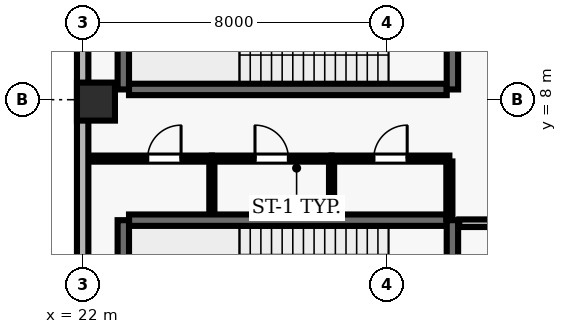
"""IFC4 building model, lengths in metres.
Left out: names, types, materials, properties, quantities, classifications, styles, units other than length and angle.
Written with IfcOpenShell. Run it as: python <this file> out.ifc"""

import sys

from ifc_helpers import new_model, si_unit, direction, frame, frame_2d, origin, origin_2d, place, context, subcontext, project, spatial, rectangle, extrude, element, fill, save


model = new_model("IFC4")
c1 = context("Model", 3, precision=1e-05, world=origin(), true_north=direction((0.0, 1.0)))
c2 = subcontext(c1, "Body", "Model", "MODEL_VIEW")
j1 = project(units=[si_unit("LENGTHUNIT", "METRE"), si_unit("PLANEANGLEUNIT", "RADIAN")], contexts=[c1])
p1 = place(None, origin())
s1 = spatial("IfcSite", under=j1, at=p1, CompositionType="ELEMENT")
p2 = place(p1, origin())
s2 = spatial("IfcBuilding", under=s1, at=p2, CompositionType="ELEMENT")
p3 = place(p2, frame((0.0, 0.0, 170.8)))
s3 = spatial("IfcBuildingStorey", under=s2, at=p3, CompositionType="ELEMENT", Elevation=170.8)
p4 = place(p3, frame((22.35, 7.95, 0.0), z_axis=(0.0, 0.0, 1.0), x_axis=(1.0, 0.0, 0.0)))
e1 = element("IfcColumn", 1, at=p4, inside=s3, PredefinedType="COLUMN", context=c2, shape_type="SweptSolid", body=[
    extrude(rectangle(XDim=1.0, YDim=1.0, at=origin_2d()), origin(), (0.0, 0.0, 1.0), 5.0),
])
p5 = place(p3, frame((22.0, 40.7, 0.0), z_axis=(0.0, 0.0, 1.0), x_axis=(0.0, -1.0, 0.0)))
e2 = element("IfcWall", 2, at=p5, inside=s3, PredefinedType="SOLIDWALL", context=c2, shape_type="SweptSolid", body=[
    extrude(rectangle(XDim=38.2, YDim=0.3, at=frame_2d((19.1, 0.0))), origin(), (0.0, 0.0, 1.0), 4.79),
])
p6 = place(p5, frame((7.8, 0.0, 0.0)))
e3 = element("IfcOpeningElement", 3, at=p6, cuts=e2, PredefinedType="OPENING", context=c2, shape_type="SweptSolid", body=[
    extrude(rectangle(XDim=1.0, YDim=2.2, at=frame_2d((0.5, 1.1))), frame((0.0, 0.16, 0.0), z_axis=(0.0, -1.0, 0.0), x_axis=(1.0, 0.0, 0.0)), (0.0, 0.0, 1.0), 0.32),
])
p7 = place(p5, frame((1.979, 0.0, 0.9)))
e4 = element("IfcOpeningElement", 4, at=p7, cuts=e2, PredefinedType="OPENING", context=c2, shape_type="SweptSolid", body=[
    extrude(rectangle(XDim=1.5, YDim=1.8, at=frame_2d((0.75, 0.9))), frame((0.0, 0.16, 0.0), z_axis=(0.0, -1.0, 0.0), x_axis=(1.0, 0.0, 0.0)), (0.0, 0.0, 1.0), 0.32),
])
p8 = place(p5, frame((12.443, 0.0, 0.9)))
e5 = element("IfcOpeningElement", 5, at=p8, cuts=e2, PredefinedType="OPENING", context=c2, shape_type="SweptSolid", body=[
    extrude(rectangle(XDim=1.5, YDim=1.8, at=frame_2d((0.75, 0.9))), frame((0.0, 0.16, 0.0), z_axis=(0.0, -1.0, 0.0), x_axis=(1.0, 0.0, 0.0)), (0.0, 0.0, 1.0), 0.32),
])
p9 = place(p5, frame((18.35, 0.0, 0.9)))
e6 = element("IfcOpeningElement", 6, at=p9, cuts=e2, PredefinedType="OPENING", context=c2, shape_type="SweptSolid", body=[
    extrude(rectangle(XDim=1.5, YDim=1.8, at=frame_2d((0.75, 0.9))), frame((0.0, 0.16, 0.0), z_axis=(0.0, -1.0, 0.0), x_axis=(1.0, 0.0, 0.0)), (0.0, 0.0, 1.0), 0.32),
])
p10 = place(p5, frame((23.807, 0.0, 0.9)))
e7 = element("IfcOpeningElement", 7, at=p10, cuts=e2, PredefinedType="OPENING", context=c2, shape_type="SweptSolid", body=[
    extrude(rectangle(XDim=1.5, YDim=1.8, at=frame_2d((0.75, 0.9))), frame((0.0, 0.16, 0.0), z_axis=(0.0, -1.0, 0.0), x_axis=(1.0, 0.0, 0.0)), (0.0, 0.0, 1.0), 0.32),
])
p11 = place(p5, frame((29.264, 0.0, 0.9)))
e8 = element("IfcOpeningElement", 8, at=p11, cuts=e2, PredefinedType="OPENING", context=c2, shape_type="SweptSolid", body=[
    extrude(rectangle(XDim=1.5, YDim=1.8, at=frame_2d((0.75, 0.9))), frame((0.0, 0.16, 0.0), z_axis=(0.0, -1.0, 0.0), x_axis=(1.0, 0.0, 0.0)), (0.0, 0.0, 1.0), 0.32),
])
p12 = place(p3, frame((31.58, 4.83, 0.0), z_axis=(0.0, 0.0, 1.0), x_axis=(-1.0, 0.0, 0.0)))
e9 = element("IfcWall", 9, at=p12, inside=s3, PredefinedType="SHEAR", context=c2, shape_type="SweptSolid", body=[
    extrude(rectangle(XDim=8.36, YDim=0.3, at=frame_2d((4.18, 0.0))), origin(), (0.0, 0.0, 1.0), 4.79),
])
p13 = place(p3, frame((23.07, 4.83, 0.0), z_axis=(0.0, 0.0, 1.0), x_axis=(0.0, -1.0, 0.0)))
e10 = element("IfcWall", 10, at=p13, inside=s3, PredefinedType="SHEAR", context=c2, shape_type="SweptSolid", body=[
    extrude(rectangle(XDim=3.51, YDim=0.3, at=frame_2d((1.755, 0.0))), origin(), (0.0, 0.0, 1.0), 4.79),
])
p14 = place(p3, frame((31.73, 0.96, 0.0), z_axis=(0.0, 0.0, 1.0), x_axis=(0.0, 1.0, 0.0)))
e11 = element("IfcWall", 11, at=p14, inside=s3, PredefinedType="SHEAR", context=c2, shape_type="SweptSolid", body=[
    extrude(rectangle(XDim=3.87, YDim=0.3, at=frame_2d((1.935, 0.0))), origin(), (0.0, 0.0, 1.0), 4.79),
])
p15 = place(p14, frame((1.54, 0.0, 0.0)))
e12 = element("IfcOpeningElement", 12, at=p15, cuts=e11, PredefinedType="OPENING", context=c2, shape_type="SweptSolid", body=[
    extrude(rectangle(XDim=1.15, YDim=2.15, at=frame_2d((0.575, 1.075))), frame((0.0, 0.16, 0.0), z_axis=(0.0, -1.0, 0.0), x_axis=(1.0, 0.0, 0.0)), (0.0, 0.0, 1.0), 0.32),
])
p16 = place(p3, frame((23.07, 11.78, 0.0), z_axis=(0.0, 0.0, 1.0), x_axis=(0.0, -1.0, 0.0)))
e13 = element("IfcWall", 13, at=p16, inside=s3, PredefinedType="SHEAR", context=c2, shape_type="SweptSolid", body=[
    extrude(rectangle(XDim=3.51, YDim=0.3, at=frame_2d((1.755, 0.0))), origin(), (0.0, 0.0, 1.0), 4.79),
])
p17 = place(p3, frame((23.22, 8.27, 0.0), z_axis=(0.0, 0.0, 1.0), x_axis=(1.0, 0.0, 0.0)))
e14 = element("IfcWall", 14, at=p17, inside=s3, PredefinedType="SHEAR", context=c2, shape_type="SweptSolid", body=[
    extrude(rectangle(XDim=8.36, YDim=0.3, at=frame_2d((4.18, 0.0))), origin(), (0.0, 0.0, 1.0), 4.79),
])
p18 = place(p3, frame((31.73, 8.27, 0.0), z_axis=(0.0, 0.0, 1.0), x_axis=(0.0, 1.0, 0.0)))
e15 = element("IfcWall", 15, at=p18, inside=s3, PredefinedType="SHEAR", context=c2, shape_type="SweptSolid", body=[
    extrude(rectangle(XDim=3.51, YDim=0.3, at=frame_2d((1.755, 0.0))), origin(), (0.0, 0.0, 1.0), 4.79),
])
p19 = place(p18, frame((1.18, 0.0, 0.0)))
e16 = element("IfcOpeningElement", 16, at=p19, cuts=e15, PredefinedType="OPENING", context=c2, shape_type="SweptSolid", body=[
    extrude(rectangle(XDim=1.15, YDim=2.15, at=frame_2d((0.575, 1.075))), frame((0.0, 0.16, 0.0), z_axis=(0.0, -1.0, 0.0), x_axis=(1.0, 0.0, 0.0)), (0.0, 0.0, 1.0), 0.32),
])
p20 = place(p3, frame((22.2, 6.45, 0.0), z_axis=(0.0, 0.0, 1.0), x_axis=(1.0, 0.0, 0.0)))
e17 = element("IfcWall", 17, at=p20, inside=s3, PredefinedType="PARTITIONING", context=c2, shape_type="SweptSolid", body=[
    extrude(rectangle(XDim=3.2, YDim=0.16, at=frame_2d((1.6, 0.0))), origin(), (0.0, 0.0, 1.0), 4.79),
])
p21 = place(p20, frame((1.51, 0.0, 0.0)))
e18 = element("IfcOpeningElement", 18, at=p21, cuts=e17, PredefinedType="OPENING", context=c2, shape_type="SweptSolid", body=[
    extrude(rectangle(XDim=0.88, YDim=2.1, at=frame_2d((0.44, 1.05))), frame((0.0, 0.09, 0.0), z_axis=(0.0, -1.0, 0.0), x_axis=(1.0, 0.0, 0.0)), (0.0, 0.0, 1.0), 0.18),
])
p22 = place(p3, frame((25.4, 6.45, 0.0), z_axis=(0.0, 0.0, 1.0), x_axis=(1.0, 0.0, 0.0)))
e19 = element("IfcWall", 19, at=p22, inside=s3, PredefinedType="PARTITIONING", context=c2, shape_type="SweptSolid", body=[
    extrude(rectangle(XDim=3.15, YDim=0.16, at=frame_2d((1.575, 0.0))), origin(), (0.0, 0.0, 1.0), 4.79),
])
p23 = place(p22, frame((1.135, 0.0, 0.0)))
e20 = element("IfcOpeningElement", 20, at=p23, cuts=e19, PredefinedType="OPENING", context=c2, shape_type="SweptSolid", body=[
    extrude(rectangle(XDim=0.88, YDim=2.1, at=frame_2d((0.44, 1.05))), frame((0.0, 0.09, 0.0), z_axis=(0.0, -1.0, 0.0), x_axis=(1.0, 0.0, 0.0)), (0.0, 0.0, 1.0), 0.18),
])
p24 = place(p3, frame((28.55, 6.45, 0.0), z_axis=(0.0, 0.0, 1.0), x_axis=(1.0, 0.0, 0.0)))
e21 = element("IfcWall", 21, at=p24, inside=s3, PredefinedType="PARTITIONING", context=c2, shape_type="SweptSolid", body=[
    extrude(rectangle(XDim=3.1, YDim=0.16, at=frame_2d((1.55, 0.0))), origin(), (0.0, 0.0, 1.0), 4.79),
])
p25 = place(p24, frame((1.11, 0.0, 0.0)))
e22 = element("IfcOpeningElement", 22, at=p25, cuts=e21, PredefinedType="OPENING", context=c2, shape_type="SweptSolid", body=[
    extrude(rectangle(XDim=0.88, YDim=2.1, at=frame_2d((0.44, 1.05))), frame((0.0, 0.09, 0.0), z_axis=(0.0, -1.0, 0.0), x_axis=(1.0, 0.0, 0.0)), (0.0, 0.0, 1.0), 0.18),
])
p26 = place(p3, frame((35.02, 4.75, 0.0), z_axis=(0.0, 0.0, 1.0), x_axis=(-1.0, 0.0, 0.0)))
e23 = element("IfcWall", 23, at=p26, inside=s3, PredefinedType="SOLIDWALL", context=c2, shape_type="SweptSolid", body=[
    extrude(rectangle(XDim=3.11, YDim=0.2, at=frame_2d((1.555, 0.0))), origin(), (0.0, 0.0, 1.0), 4.79),
])
p27 = place(p26, frame((1.03, 0.0, 0.0)))
e24 = element("IfcOpeningElement", 24, at=p27, cuts=e23, PredefinedType="OPENING", context=c2, shape_type="SweptSolid", body=[
    extrude(rectangle(XDim=1.05, YDim=2.15, at=frame_2d((0.525, 1.075))), frame((0.0, 0.11, 0.0), z_axis=(0.0, -1.0, 0.0), x_axis=(1.0, 0.0, 0.0)), (0.0, 0.0, 1.0), 0.22),
])
for number, where, z_axis, x_axis in (
    (25, (25.4, 5.01, 0.0), (0.0, 0.0, 1.0), (0.0, 1.0, 0.0)),
    (26, (28.55, 5.01, 0.0), (0.0, 0.0, 1.0), (0.0, 1.0, 0.0)),
):
    element("IfcWall", number, at=place(p3, frame(where, z_axis=z_axis, x_axis=x_axis)), inside=s3, PredefinedType="PARTITIONING", context=c2, shape_type="SweptSolid", body=[
        extrude(rectangle(XDim=1.365, YDim=0.135, at=frame_2d((0.683, 0.0))), origin(), (0.0, 0.0, 1.0), 4.79),
    ])
p28 = place(p3, frame((31.65, 4.86, 0.0), z_axis=(0.0, 0.0, 1.0), x_axis=(0.0, 1.0, 0.0)))
e27 = element("IfcWall", 27, at=p28, inside=s3, PredefinedType="PARTITIONING", context=c2, shape_type="SweptSolid", body=[
    extrude(rectangle(XDim=1.515, YDim=0.16, at=frame_2d((0.757, 0.0))), origin(), (0.0, 0.0, 1.0), 4.79),
])
p29 = place(p21, origin())
e28 = element("IfcDoor", 28, at=p29, inside=s3, OperationType="SINGLE_SWING_RIGHT", PredefinedType="DOOR", context=c2, shape_type="SweptSolid", body=[
    extrude(rectangle(XDim=0.88, YDim=2.1, at=frame_2d((0.44, 1.05))), frame((0.0, 0.025, 0.0), z_axis=(0.0, -1.0, 0.0), x_axis=(1.0, 0.0, 0.0)), (0.0, 0.0, 1.0), 0.05),
])
fill(e18, e28)
p30 = place(p23, origin())
e29 = element("IfcDoor", 29, at=p30, inside=s3, OperationType="SINGLE_SWING_LEFT", PredefinedType="DOOR", context=c2, shape_type="SweptSolid", body=[
    extrude(rectangle(XDim=0.88, YDim=2.1, at=frame_2d((0.44, 1.05))), frame((0.0, 0.025, 0.0), z_axis=(0.0, -1.0, 0.0), x_axis=(1.0, 0.0, 0.0)), (0.0, 0.0, 1.0), 0.05),
])
fill(e20, e29)
p31 = place(p25, origin())
e30 = element("IfcDoor", 30, at=p31, inside=s3, OperationType="SINGLE_SWING_RIGHT", PredefinedType="DOOR", context=c2, shape_type="SweptSolid", body=[
    extrude(rectangle(XDim=0.88, YDim=2.1, at=frame_2d((0.44, 1.05))), frame((0.0, 0.025, 0.0), z_axis=(0.0, -1.0, 0.0), x_axis=(1.0, 0.0, 0.0)), (0.0, 0.0, 1.0), 0.05),
])
fill(e22, e30)
save(model, sys.argv[1])
